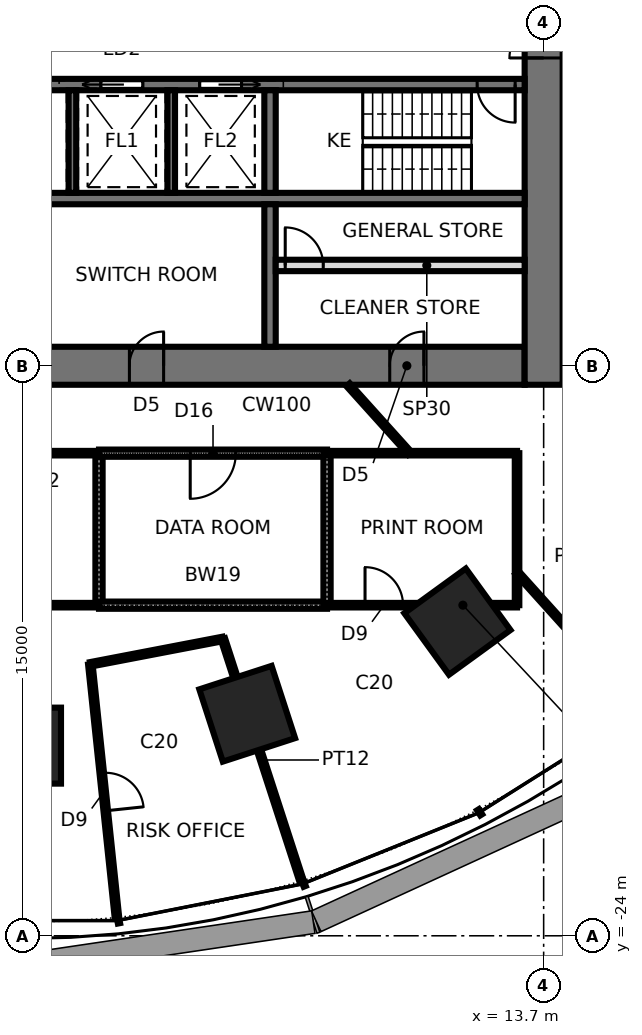
"""IFC4 building model, lengths in metres.
Left out: names, types, materials, properties, quantities, classifications, styles, units other than length and angle.
Written with IfcOpenShell. Run it as: python <this file> out.ifc"""

import sys

from ifc_helpers import new_model, si_unit, direction, frame, frame_2d, origin, origin_2d, place, context, subcontext, project, spatial, rectangle, extrude, element, fill, save


model = new_model("IFC4")
c1 = context("Model", 3, precision=1e-05, world=origin(), true_north=direction((0.0, 1.0)))
c2 = subcontext(c1, "Body", "Model", "MODEL_VIEW")
j1 = project(units=[si_unit("LENGTHUNIT", "METRE"), si_unit("PLANEANGLEUNIT", "RADIAN")], contexts=[c1])
p1 = place(None, origin())
s1 = spatial("IfcSite", under=j1, at=p1, CompositionType="ELEMENT")
p2 = place(p1, origin())
s2 = spatial("IfcBuilding", under=s1, at=p2, CompositionType="ELEMENT")
p3 = place(p2, frame((0.0, 0.0, 57.4)))
s3 = spatial("IfcBuildingStorey", under=s2, at=p3, CompositionType="ELEMENT", Elevation=57.4)
for number, where, z_axis, x_axis in (
    (1, (0.0, -18.996, 0.0), (0.0, 0.0, 1.0), (0.0, -1.0, 0.0)),
    (2, (5.9, -18.157, 0.0), (0.0, 0.0, 1.0), (0.309, -0.951, 0.0)),
    (3, (11.43, -15.733, 0.0), (0.0, 0.0, 1.0), (0.588, -0.809, 0.0)),
):
    element("IfcColumn", number, at=place(p3, frame(where, z_axis=z_axis, x_axis=x_axis)), inside=s3, PredefinedType="COLUMN", context=c2, shape_type="SweptSolid", body=[
        extrude(rectangle(XDim=2.0, YDim=2.0, at=origin_2d()), origin(), (0.0, 0.0, 1.0), 4.2),
    ])
p4 = place(p3, frame((-13.2, -9.0, 0.0), z_axis=(0.0, 0.0, 1.0), x_axis=(1.0, 0.0, 0.0)))
e4 = element("IfcWall", 4, at=p4, inside=s3, PredefinedType="SHEAR", context=c2, shape_type="SweptSolid", body=[
    extrude(rectangle(XDim=26.4, YDim=1.0, at=frame_2d((13.2, 0.0))), origin(), (0.0, 0.0, 1.0), 4.2),
])
p5 = place(p4, frame((2.65, 0.0, 0.0)))
e5 = element("IfcOpeningElement", 5, at=p5, cuts=e4, PredefinedType="OPENING", context=c2, shape_type="SweptSolid", body=[
    extrude(rectangle(XDim=0.9, YDim=2.1, at=frame_2d((0.45, 1.05))), frame((0.0, 0.51, 0.0), z_axis=(0.0, -1.0, 0.0), x_axis=(1.0, 0.0, 0.0)), (0.0, 0.0, 1.0), 1.02),
])
p6 = place(p4, frame((9.5, 0.0, 0.0)))
e6 = element("IfcOpeningElement", 6, at=p6, cuts=e4, PredefinedType="OPENING", context=c2, shape_type="SweptSolid", body=[
    extrude(rectangle(XDim=0.9, YDim=2.1, at=frame_2d((0.45, 1.05))), frame((0.0, 0.51, 0.0), z_axis=(0.0, -1.0, 0.0), x_axis=(1.0, 0.0, 0.0)), (0.0, 0.0, 1.0), 1.02),
])
p7 = place(p4, frame((16.0, 0.0, 0.0)))
e7 = element("IfcOpeningElement", 7, at=p7, cuts=e4, PredefinedType="OPENING", context=c2, shape_type="SweptSolid", body=[
    extrude(rectangle(XDim=0.9, YDim=2.1, at=frame_2d((0.45, 1.05))), frame((0.0, 0.51, 0.0), z_axis=(0.0, -1.0, 0.0), x_axis=(1.0, 0.0, 0.0)), (0.0, 0.0, 1.0), 1.02),
])
p8 = place(p4, frame((22.85, 0.0, 0.0)))
e8 = element("IfcOpeningElement", 8, at=p8, cuts=e4, PredefinedType="OPENING", context=c2, shape_type="SweptSolid", body=[
    extrude(rectangle(XDim=0.9, YDim=2.1, at=frame_2d((0.45, 1.05))), frame((0.0, 0.51, 0.0), z_axis=(0.0, -1.0, 0.0), x_axis=(1.0, 0.0, 0.0)), (0.0, 0.0, 1.0), 1.02),
])
p9 = place(p3, frame((13.7, -9.5, 0.0), z_axis=(0.0, 0.0, 1.0), x_axis=(0.0, 1.0, 0.0)))
e9 = element("IfcWall", 9, at=p9, inside=s3, PredefinedType="SHEAR", context=c2, shape_type="SweptSolid", body=[
    extrude(rectangle(XDim=19.0, YDim=1.0, at=frame_2d((9.5, 0.0))), origin(), (0.0, 0.0, 1.0), 4.2),
])
p10 = place(p9, frame((8.6, 0.0, 0.0)))
e10 = element("IfcOpeningElement", 10, at=p10, cuts=e9, PredefinedType="OPENING", context=c2, shape_type="SweptSolid", body=[
    extrude(rectangle(XDim=1.8, YDim=2.4, at=frame_2d((0.9, 1.2))), frame((0.0, 0.51, 0.0), z_axis=(0.0, -1.0, 0.0), x_axis=(1.0, 0.0, 0.0)), (0.0, 0.0, 1.0), 1.02),
])
p11 = place(p3, frame((-13.2, -1.6, 0.0), z_axis=(0.0, 0.0, 1.0), x_axis=(1.0, 0.0, 0.0)))
e11 = element("IfcWall", 11, at=p11, inside=s3, PredefinedType="SHEAR", context=c2, shape_type="SweptSolid", body=[
    extrude(rectangle(XDim=26.4, YDim=0.3, at=frame_2d((13.2, 0.0))), origin(), (0.0, 0.0, 1.0), 4.2),
])
p12 = place(p11, frame((25.15, 0.0, 0.0)))
e12 = element("IfcOpeningElement", 12, at=p12, cuts=e11, PredefinedType="OPENING", context=c2, shape_type="SweptSolid", body=[
    extrude(rectangle(XDim=1.0, YDim=2.1, at=frame_2d((0.5, 1.05))), frame((0.0, 0.16, 0.0), z_axis=(0.0, -1.0, 0.0), x_axis=(1.0, 0.0, 0.0)), (0.0, 0.0, 1.0), 0.32),
])
p13 = place(p11, frame((15.25, 0.0, 0.0)))
e13 = element("IfcOpeningElement", 13, at=p13, cuts=e11, PredefinedType="OPENING", context=c2, shape_type="SweptSolid", body=[
    extrude(rectangle(XDim=1.1, YDim=2.3, at=frame_2d((0.55, 1.15))), frame((0.0, 0.16, 0.0), z_axis=(0.0, -1.0, 0.0), x_axis=(1.0, 0.0, 0.0)), (0.0, 0.0, 1.0), 0.32),
])
p14 = place(p11, frame((17.85, 0.0, 0.0)))
e14 = element("IfcOpeningElement", 14, at=p14, cuts=e11, PredefinedType="OPENING", context=c2, shape_type="SweptSolid", body=[
    extrude(rectangle(XDim=1.1, YDim=2.3, at=frame_2d((0.55, 1.15))), frame((0.0, 0.16, 0.0), z_axis=(0.0, -1.0, 0.0), x_axis=(1.0, 0.0, 0.0)), (0.0, 0.0, 1.0), 0.32),
])
p15 = place(p11, frame((5.55, 0.0, 0.0)))
e15 = element("IfcOpeningElement", 15, at=p15, cuts=e11, PredefinedType="OPENING", context=c2, shape_type="SweptSolid", body=[
    extrude(rectangle(XDim=0.9, YDim=2.1, at=frame_2d((0.45, 1.05))), frame((0.0, 0.16, 0.0), z_axis=(0.0, -1.0, 0.0), x_axis=(1.0, 0.0, 0.0)), (0.0, 0.0, 1.0), 0.32),
])
p16 = place(p3, frame((-13.2, -4.6, 0.0), z_axis=(0.0, 0.0, 1.0), x_axis=(1.0, 0.0, 0.0)))
e16 = element("IfcWall", 16, at=p16, inside=s3, PredefinedType="SHEAR", context=c2, shape_type="SweptSolid", body=[
    extrude(rectangle(XDim=26.4, YDim=0.3, at=frame_2d((13.2, 0.0))), origin(), (0.0, 0.0, 1.0), 4.2),
])
p17 = place(p3, frame((6.5, -1.75, 0.0), z_axis=(0.0, 0.0, 1.0), x_axis=(0.0, -1.0, 0.0)))
e17 = element("IfcWall", 17, at=p17, inside=s3, PredefinedType="SHEAR", context=c2, shape_type="SweptSolid", body=[
    extrude(rectangle(XDim=2.7, YDim=0.3, at=frame_2d((1.35, 0.0))), origin(), (0.0, 0.0, 1.0), 4.2),
])
p18 = place(p3, frame((6.5, -4.75, 0.0), z_axis=(0.0, 0.0, 1.0), x_axis=(0.0, -1.0, 0.0)))
e18 = element("IfcWall", 18, at=p18, inside=s3, PredefinedType="SHEAR", context=c2, shape_type="SweptSolid", body=[
    extrude(rectangle(XDim=3.75, YDim=0.3, at=frame_2d((1.875, 0.0))), origin(), (0.0, 0.0, 1.0), 4.2),
])
for number, where, z_axis, x_axis in (
    (19, (1.3, -1.75, 0.0), (0.0, 0.0, 1.0), (0.0, -1.0, 0.0)),
    (20, (3.9, -1.75, 0.0), (0.0, 0.0, 1.0), (0.0, -1.0, 0.0)),
):
    element("IfcWall", number, at=place(p3, frame(where, z_axis=z_axis, x_axis=x_axis)), inside=s3, PredefinedType="SHEAR", context=c2, shape_type="SweptSolid", body=[
        extrude(rectangle(XDim=2.7, YDim=0.2, at=frame_2d((1.35, 0.0))), origin(), (0.0, 0.0, 1.0), 4.2),
    ])
p19 = place(p3, frame((6.65, -6.36, 0.0), z_axis=(0.0, 0.0, 1.0), x_axis=(1.0, 0.0, 0.0)))
e21 = element("IfcWall", 21, at=p19, inside=s3, PredefinedType="PARTITIONING", context=c2, shape_type="SweptSolid", body=[
    extrude(rectangle(XDim=6.55, YDim=0.3, at=frame_2d((3.275, 0.0))), origin(), (0.0, 0.0, 1.0), 4.04),
])
p20 = place(p19, frame((0.25, 0.0, 0.0)))
e22 = element("IfcOpeningElement", 22, at=p20, cuts=e21, PredefinedType="OPENING", context=c2, shape_type="SweptSolid", body=[
    extrude(rectangle(XDim=1.0, YDim=2.4, at=frame_2d((0.5, 1.2))), frame((0.0, 0.16, 0.0), z_axis=(0.0, -1.0, 0.0), x_axis=(1.0, 0.0, 0.0)), (0.0, 0.0, 1.0), 0.32),
])
p21 = place(p3, frame((2.0, -11.3, 0.0), z_axis=(0.0, 0.0, 1.0), x_axis=(-1.0, 0.0, 0.0)))
e23 = element("IfcWall", 23, at=p21, inside=s3, PredefinedType="PARTITIONING", context=c2, shape_type="SweptSolid", body=[
    extrude(rectangle(XDim=8.0, YDim=0.12, at=frame_2d((4.0, 0.0))), origin(), (0.0, 0.0, 1.0), 4.04),
])
p22 = place(p21, frame((3.5, 0.0, 0.0)))
e24 = element("IfcOpeningElement", 24, at=p22, cuts=e23, PredefinedType="OPENING", context=c2, shape_type="SweptSolid", body=[
    extrude(rectangle(XDim=1.0, YDim=2.4, at=frame_2d((0.5, 1.2))), frame((0.0, 0.07, 0.0), z_axis=(0.0, -1.0, 0.0), x_axis=(1.0, 0.0, 0.0)), (0.0, 0.0, 1.0), 0.14),
])
p23 = place(p3, frame((-6.0, -15.3, 0.0), z_axis=(0.0, 0.0, 1.0), x_axis=(1.0, 0.0, 0.0)))
e25 = element("IfcWall", 25, at=p23, inside=s3, PredefinedType="PARTITIONING", context=c2, shape_type="SweptSolid", body=[
    extrude(rectangle(XDim=8.0, YDim=0.12, at=frame_2d((4.0, 0.0))), origin(), (0.0, 0.0, 1.0), 3.586),
])
p24 = place(p3, frame((1.772, -16.857, 0.0), z_axis=(0.0, 0.0, 1.0), x_axis=(0.104542522915, -0.994520417539, 0.0)))
e26 = element("IfcWall", 26, at=p24, inside=s3, PredefinedType="PARTITIONING", context=c2, shape_type="SweptSolid", body=[
    extrude(rectangle(XDim=6.7, YDim=0.12, at=frame_2d((3.35, 0.0))), origin(), (0.0, 0.0, 1.0), 4.04),
])
p25 = place(p24, frame((2.875, 0.0, 0.0)))
e27 = element("IfcOpeningElement", 27, at=p25, cuts=e26, PredefinedType="OPENING", context=c2, shape_type="SweptSolid", body=[
    extrude(rectangle(XDim=1.0, YDim=2.4, at=frame_2d((0.5, 1.2))), frame((0.0, 0.07, 0.0), z_axis=(0.0, -1.0, 0.0), x_axis=(1.0, 0.0, 0.0)), (0.0, 0.0, 1.0), 0.14),
])
p26 = place(p3, frame((2.0, -11.3, 0.0), z_axis=(0.0, 0.0, 1.0), x_axis=(0.0, -1.0, 0.0)))
e28 = element("IfcWall", 28, at=p26, inside=s3, PredefinedType="SOLIDWALL", context=c2, shape_type="SweptSolid", body=[
    extrude(rectangle(XDim=4.0, YDim=0.19, at=frame_2d((2.0, 0.0))), origin(), (0.0, 0.0, 1.0), 4.04),
])
p27 = place(p3, frame((5.26, -16.188, 0.0), z_axis=(0.0, 0.0, 1.0), x_axis=(-0.982089213151, -0.188416499842, 0.0)))
e29 = element("IfcWall", 29, at=p27, inside=s3, PredefinedType="PARTITIONING", context=c2, shape_type="SweptSolid", body=[
    extrude(rectangle(XDim=3.552, YDim=0.12, at=frame_2d((1.776, 0.0))), origin(), (0.0, 0.0, 1.0), 4.04),
])
p28 = place(p3, frame((7.33, -22.56, 0.0), z_axis=(0.0, 0.0, 1.0), x_axis=(-0.309003676349, 0.951060843481, 0.0)))
e30 = element("IfcWall", 30, at=p28, inside=s3, PredefinedType="PARTITIONING", context=c2, shape_type="SweptSolid", body=[
    extrude(rectangle(XDim=6.7, YDim=0.12, at=frame_2d((3.35, 0.0))), origin(), (0.0, 0.0, 1.0), 2.84),
])
p29 = place(p3, frame((2.0, -15.3, 0.0), z_axis=(0.0, 0.0, 1.0), x_axis=(1.0, 0.0, 0.0)))
e31 = element("IfcWall", 31, at=p29, inside=s3, PredefinedType="SOLIDWALL", context=c2, shape_type="SweptSolid", body=[
    extrude(rectangle(XDim=6.0, YDim=0.19, at=frame_2d((3.0, 0.0))), origin(), (0.0, 0.0, 1.0), 3.586),
])
p30 = place(p3, frame((8.0, -11.3, 0.0), z_axis=(0.0, 0.0, 1.0), x_axis=(-1.0, 0.0, 0.0)))
e32 = element("IfcWall", 32, at=p30, inside=s3, PredefinedType="SOLIDWALL", context=c2, shape_type="SweptSolid", body=[
    extrude(rectangle(XDim=6.0, YDim=0.19, at=frame_2d((3.0, 0.0))), origin(), (0.0, 0.0, 1.0), 4.04),
])
p31 = place(p30, frame((2.4, 0.0, 0.0)))
e33 = element("IfcOpeningElement", 33, at=p31, cuts=e32, PredefinedType="OPENING", context=c2, shape_type="SweptSolid", body=[
    extrude(rectangle(XDim=1.2, YDim=2.1, at=frame_2d((0.6, 1.05))), frame((0.0, 0.105, 0.0), z_axis=(0.0, -1.0, 0.0), x_axis=(1.0, 0.0, 0.0)), (0.0, 0.0, 1.0), 0.21),
])
p32 = place(p3, frame((8.0, -11.3, 0.0), z_axis=(0.0, 0.0, 1.0), x_axis=(0.0, -1.0, 0.0)))
e34 = element("IfcWall", 34, at=p32, inside=s3, PredefinedType="SOLIDWALL", context=c2, shape_type="SweptSolid", body=[
    extrude(rectangle(XDim=4.0, YDim=0.19, at=frame_2d((2.0, 0.0))), origin(), (0.0, 0.0, 1.0), 4.04),
])
p33 = place(p3, frame((8.0, -15.3, 0.0), z_axis=(0.0, 0.0, 1.0), x_axis=(1.0, 0.0, 0.0)))
e35 = element("IfcWall", 35, at=p33, inside=s3, PredefinedType="PARTITIONING", context=c2, shape_type="SweptSolid", body=[
    extrude(rectangle(XDim=5.0, YDim=0.12, at=frame_2d((2.5, 0.0))), origin(), (0.0, 0.0, 1.0), 4.04),
])
p34 = place(p33, frame((1.0, 0.0, 0.0)))
e36 = element("IfcOpeningElement", 36, at=p34, cuts=e35, PredefinedType="OPENING", context=c2, shape_type="SweptSolid", body=[
    extrude(rectangle(XDim=1.0, YDim=2.4, at=frame_2d((0.5, 1.2))), frame((0.0, 0.07, 0.0), z_axis=(0.0, -1.0, 0.0), x_axis=(1.0, 0.0, 0.0)), (0.0, 0.0, 1.0), 0.14),
])
p35 = place(p3, frame((10.175, -11.3, 0.0), z_axis=(0.0, 0.0, 1.0), x_axis=(-0.669148472958, 0.74312873793, 0.0)))
e37 = element("IfcWall", 37, at=p35, inside=s3, PredefinedType="PARTITIONING", context=c2, shape_type="SweptSolid", body=[
    extrude(rectangle(XDim=2.422, YDim=0.12, at=frame_2d((1.211, 0.0))), origin(), (0.0, 0.0, 1.0), 4.04),
])
p36 = place(p3, frame((16.214, -18.008, 0.0), z_axis=(0.0, 0.0, 1.0), x_axis=(-0.669138803937, 0.743137444263, 0.0)))
e38 = element("IfcWall", 38, at=p36, inside=s3, PredefinedType="PARTITIONING", context=c2, shape_type="SweptSolid", body=[
    extrude(rectangle(XDim=4.804, YDim=0.12, at=frame_2d((2.402, 0.0))), origin(), (0.0, 0.0, 1.0), 4.04),
])
p37 = place(p3, frame((13.0, -11.3, 0.0), z_axis=(0.0, 0.0, 1.0), x_axis=(-1.0, 0.0, 0.0)))
e39 = element("IfcWall", 39, at=p37, inside=s3, PredefinedType="PARTITIONING", context=c2, shape_type="SweptSolid", body=[
    extrude(rectangle(XDim=5.0, YDim=0.12, at=frame_2d((2.5, 0.0))), origin(), (0.0, 0.0, 1.0), 4.04),
])
p38 = place(p3, frame((13.0, -15.3, 0.0), z_axis=(0.0, 0.0, 1.0), x_axis=(0.0, 1.0, 0.0)))
e40 = element("IfcWall", 40, at=p38, inside=s3, PredefinedType="PARTITIONING", context=c2, shape_type="SweptSolid", body=[
    extrude(rectangle(XDim=4.0, YDim=0.12, at=frame_2d((2.0, 0.0))), origin(), (0.0, 0.0, 1.0), 4.04),
])
p39 = place(p10, origin())
e41 = element("IfcDoor", 41, at=p39, inside=s3, OperationType="DOUBLE_DOOR_SINGLE_SWING", PredefinedType="DOOR", context=c2, shape_type="SweptSolid", body=[
    extrude(rectangle(XDim=1.72, YDim=2.36, at=frame_2d((0.9, 1.18))), frame((0.0, 0.025, 0.0), z_axis=(0.0, -1.0, 0.0), x_axis=(1.0, 0.0, 0.0)), (0.0, 0.0, 1.0), 0.05),
    extrude(rectangle(XDim=0.04, YDim=2.4, at=frame_2d((0.02, 1.2))), frame((0.0, 0.25, 0.0), z_axis=(0.0, -1.0, 0.0), x_axis=(1.0, 0.0, 0.0)), (0.0, 0.0, 1.0), 0.5),
    extrude(rectangle(XDim=0.04, YDim=2.4, at=frame_2d((1.78, 1.2))), frame((0.0, 0.25, 0.0), z_axis=(0.0, -1.0, 0.0), x_axis=(1.0, 0.0, 0.0)), (0.0, 0.0, 1.0), 0.5),
    extrude(rectangle(XDim=1.72, YDim=0.04, at=frame_2d((0.9, 2.38))), frame((0.0, 0.25, 0.0), z_axis=(0.0, -1.0, 0.0), x_axis=(1.0, 0.0, 0.0)), (0.0, 0.0, 1.0), 0.5),
])
fill(e10, e41)
p40 = place(p12, frame((1.0, 0.0, 0.0), z_axis=(0.0, 0.0, 1.0), x_axis=(-1.0, 0.0, 0.0)))
e42 = element("IfcDoor", 42, at=p40, inside=s3, OperationType="SINGLE_SWING_LEFT", PredefinedType="DOOR", context=c2, shape_type="SweptSolid", body=[
    extrude(rectangle(XDim=1.0, YDim=2.1, at=frame_2d((0.5, 1.05))), frame((0.0, 0.025, 0.0), z_axis=(0.0, -1.0, 0.0), x_axis=(1.0, 0.0, 0.0)), (0.0, 0.0, 1.0), 0.05),
])
fill(e12, e42)
p41 = place(p13, frame((1.1, 0.0, 0.0), z_axis=(0.0, 0.0, 1.0), x_axis=(-1.0, 0.0, 0.0)))
e43 = element("IfcDoor", 43, at=p41, inside=s3, OperationType="SLIDING_TO_RIGHT", PredefinedType="DOOR", context=c2, shape_type="SweptSolid", body=[
    extrude(rectangle(XDim=1.1, YDim=2.3, at=frame_2d((0.55, 1.15))), frame((0.0, 0.025, 0.0), z_axis=(0.0, -1.0, 0.0), x_axis=(1.0, 0.0, 0.0)), (0.0, 0.0, 1.0), 0.05),
])
fill(e13, e43)
p42 = place(p14, frame((1.1, 0.0, 0.0), z_axis=(0.0, 0.0, 1.0), x_axis=(-1.0, 0.0, 0.0)))
e44 = element("IfcDoor", 44, at=p42, inside=s3, OperationType="SLIDING_TO_LEFT", PredefinedType="DOOR", context=c2, shape_type="SweptSolid", body=[
    extrude(rectangle(XDim=1.1, YDim=2.3, at=frame_2d((0.55, 1.15))), frame((0.0, 0.025, 0.0), z_axis=(0.0, -1.0, 0.0), x_axis=(1.0, 0.0, 0.0)), (0.0, 0.0, 1.0), 0.05),
])
fill(e14, e44)
p43 = place(p7, origin())
e45 = element("IfcDoor", 45, at=p43, inside=s3, OperationType="SINGLE_SWING_RIGHT", PredefinedType="DOOR", context=c2, shape_type="SweptSolid", body=[
    extrude(rectangle(XDim=0.82, YDim=2.06, at=frame_2d((0.45, 1.03))), frame((0.0, 0.025, 0.0), z_axis=(0.0, -1.0, 0.0), x_axis=(1.0, 0.0, 0.0)), (0.0, 0.0, 1.0), 0.05),
    extrude(rectangle(XDim=0.04, YDim=2.1, at=frame_2d((0.02, 1.05))), frame((0.0, 0.25, 0.0), z_axis=(0.0, -1.0, 0.0), x_axis=(1.0, 0.0, 0.0)), (0.0, 0.0, 1.0), 0.5),
    extrude(rectangle(XDim=0.04, YDim=2.1, at=frame_2d((0.88, 1.05))), frame((0.0, 0.25, 0.0), z_axis=(0.0, -1.0, 0.0), x_axis=(1.0, 0.0, 0.0)), (0.0, 0.0, 1.0), 0.5),
    extrude(rectangle(XDim=0.82, YDim=0.04, at=frame_2d((0.45, 2.08))), frame((0.0, 0.25, 0.0), z_axis=(0.0, -1.0, 0.0), x_axis=(1.0, 0.0, 0.0)), (0.0, 0.0, 1.0), 0.5),
])
fill(e7, e45)
p44 = place(p8, origin())
e46 = element("IfcDoor", 46, at=p44, inside=s3, OperationType="SINGLE_SWING_RIGHT", PredefinedType="DOOR", context=c2, shape_type="SweptSolid", body=[
    extrude(rectangle(XDim=0.82, YDim=2.06, at=frame_2d((0.45, 1.03))), frame((0.0, 0.025, 0.0), z_axis=(0.0, -1.0, 0.0), x_axis=(1.0, 0.0, 0.0)), (0.0, 0.0, 1.0), 0.05),
    extrude(rectangle(XDim=0.04, YDim=2.1, at=frame_2d((0.02, 1.05))), frame((0.0, 0.25, 0.0), z_axis=(0.0, -1.0, 0.0), x_axis=(1.0, 0.0, 0.0)), (0.0, 0.0, 1.0), 0.5),
    extrude(rectangle(XDim=0.04, YDim=2.1, at=frame_2d((0.88, 1.05))), frame((0.0, 0.25, 0.0), z_axis=(0.0, -1.0, 0.0), x_axis=(1.0, 0.0, 0.0)), (0.0, 0.0, 1.0), 0.5),
    extrude(rectangle(XDim=0.82, YDim=0.04, at=frame_2d((0.45, 2.08))), frame((0.0, 0.25, 0.0), z_axis=(0.0, -1.0, 0.0), x_axis=(1.0, 0.0, 0.0)), (0.0, 0.0, 1.0), 0.5),
])
fill(e8, e46)
p45 = place(p20, origin())
e47 = element("IfcDoor", 47, at=p45, inside=s3, OperationType="SINGLE_SWING_LEFT", PredefinedType="DOOR", context=c2, shape_type="SweptSolid", body=[
    extrude(rectangle(XDim=1.0, YDim=2.4, at=frame_2d((0.5, 1.2))), frame((0.0, 0.025, 0.0), z_axis=(0.0, -1.0, 0.0), x_axis=(1.0, 0.0, 0.0)), (0.0, 0.0, 1.0), 0.05),
])
fill(e22, e47)
p46 = place(p25, origin())
e48 = element("IfcDoor", 48, at=p46, inside=s3, OperationType="SINGLE_SWING_RIGHT", PredefinedType="DOOR", context=c2, shape_type="SweptSolid", body=[
    extrude(rectangle(XDim=1.0, YDim=2.4, at=frame_2d((0.5, 1.2))), frame((0.0, 0.025, 0.0), z_axis=(0.0, -1.0, 0.0), x_axis=(1.0, 0.0, 0.0)), (0.0, 0.0, 1.0), 0.05),
])
fill(e27, e48)
p47 = place(p31, origin())
e49 = element("IfcDoor", 49, at=p47, inside=s3, OperationType="SINGLE_SWING_RIGHT", PredefinedType="DOOR", context=c2, shape_type="SweptSolid", body=[
    extrude(rectangle(XDim=1.2, YDim=2.1, at=frame_2d((0.6, 1.05))), frame((0.0, 0.025, 0.0), z_axis=(0.0, -1.0, 0.0), x_axis=(1.0, 0.0, 0.0)), (0.0, 0.0, 1.0), 0.05),
])
fill(e33, e49)
p48 = place(p34, origin())
e50 = element("IfcDoor", 50, at=p48, inside=s3, OperationType="SINGLE_SWING_LEFT", PredefinedType="DOOR", context=c2, shape_type="SweptSolid", body=[
    extrude(rectangle(XDim=1.0, YDim=2.4, at=frame_2d((0.5, 1.2))), frame((0.0, 0.025, 0.0), z_axis=(0.0, -1.0, 0.0), x_axis=(1.0, 0.0, 0.0)), (0.0, 0.0, 1.0), 0.05),
])
fill(e36, e50)
save(model, sys.argv[1])
